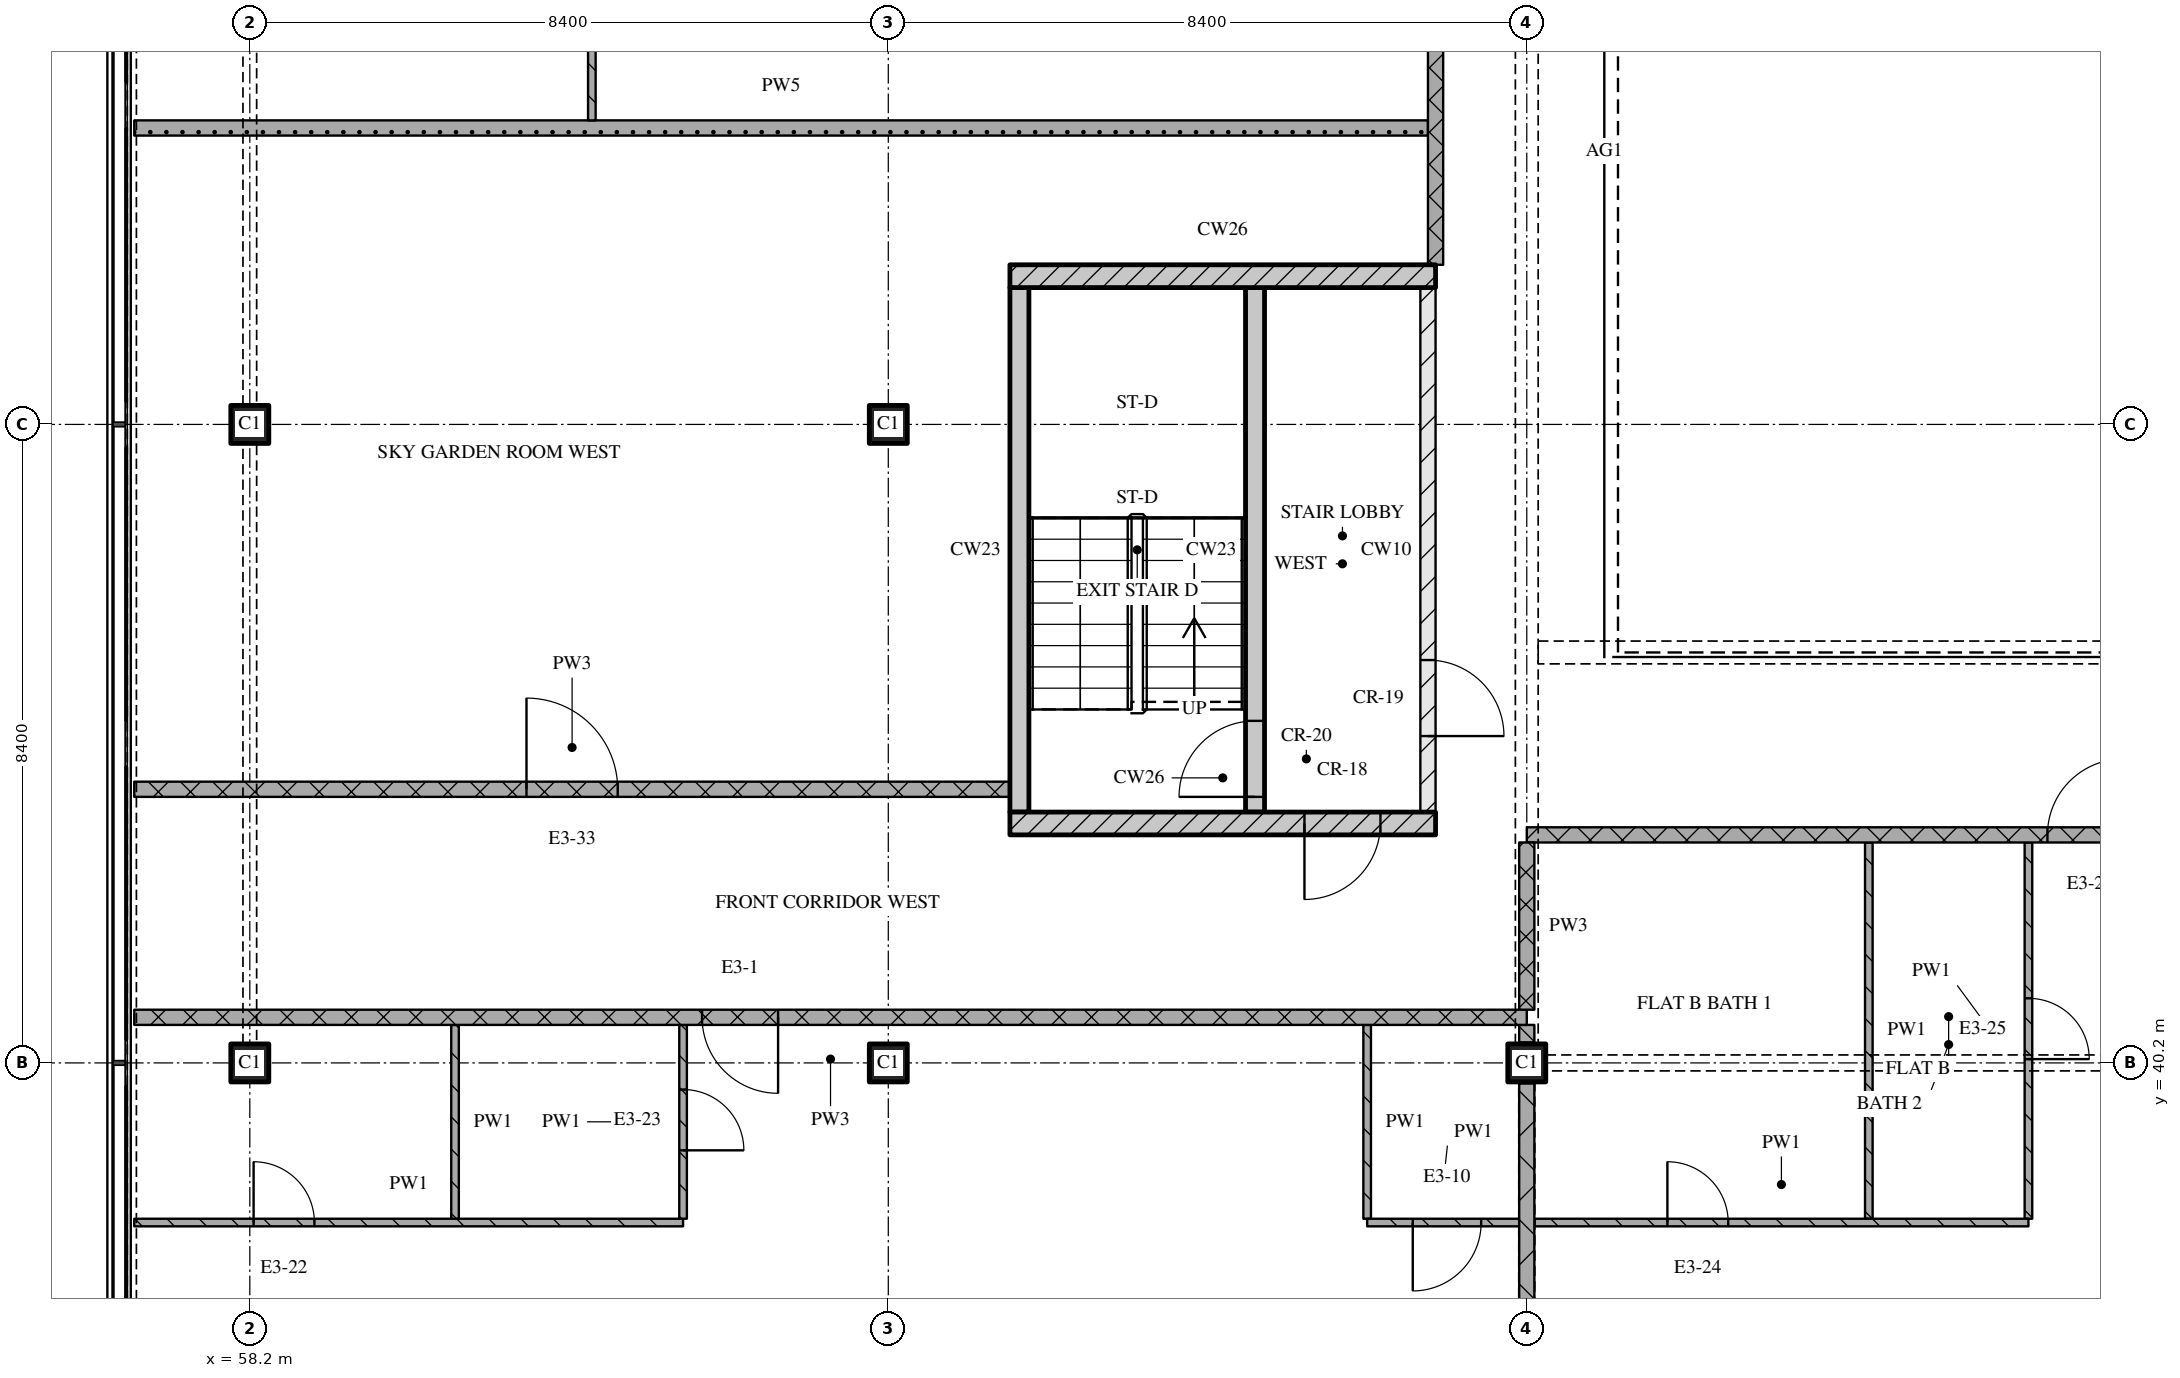
"""IFC4 building model, lengths in metres.
Left out: names, types, materials, properties, quantities, classifications, styles, units other than length and angle.
Written with IfcOpenShell. Run it as: python <this file> out.ifc"""

import sys

from ifc_helpers import new_model, si_unit, direction, frame, frame_2d, origin, origin_2d, place, context, subcontext, project, spatial, rectangle, extrude, element, fill, save


model = new_model("IFC4")
c1 = context("Model", 3, precision=1e-05, world=origin(), true_north=direction((0.0, 1.0)))
c2 = subcontext(c1, "Body", "Model", "MODEL_VIEW")
j1 = project(units=[si_unit("LENGTHUNIT", "METRE"), si_unit("PLANEANGLEUNIT", "RADIAN")], contexts=[c1])
p1 = place(None, origin())
s1 = spatial("IfcSite", under=j1, at=p1, CompositionType="ELEMENT")
p2 = place(p1, origin())
s2 = spatial("IfcBuilding", under=s1, at=p2, CompositionType="ELEMENT")
p3 = place(p2, frame((0.0, 0.0, 274.35)))
s3 = spatial("IfcBuildingStorey", under=s2, at=p3, CompositionType="ELEMENT", Elevation=274.35)
for number, where, z_axis, x_axis in (
    (1, (58.2, 40.2, 0.0), (0.0, 0.0, 1.0), (1.0, 0.0, 0.0)),
    (2, (58.2, 48.6, 0.0), (0.0, 0.0, 1.0), (1.0, 0.0, 0.0)),
    (3, (66.6, 40.2, 0.0), (0.0, 0.0, 1.0), (1.0, 0.0, 0.0)),
    (4, (66.6, 48.6, 0.0), (0.0, 0.0, 1.0), (1.0, 0.0, 0.0)),
    (5, (75.0, 40.2, 0.0), (0.0, 0.0, 1.0), (1.0, 0.0, 0.0)),
):
    element("IfcColumn", number, at=place(p3, frame(where, z_axis=z_axis, x_axis=x_axis)), inside=s3, PredefinedType="COLUMN", context=c2, shape_type="SweptSolid", body=[
        extrude(rectangle(XDim=0.5, YDim=0.5, at=origin_2d()), origin(), (0.0, 0.0, 1.0), 3.6),
    ])
p4 = place(p3, frame((68.2, 43.35, 0.0), z_axis=(0.0, 0.0, 1.0), x_axis=(1.0, 0.0, 0.0)))
e6 = element("IfcWall", 6, at=p4, inside=s3, PredefinedType="SOLIDWALL", context=c2, shape_type="SweptSolid", body=[
    extrude(rectangle(XDim=5.6, YDim=0.3, at=frame_2d((2.8, 0.0))), origin(), (0.0, 0.0, 1.0), 3.32),
])
p5 = place(p4, frame((3.875, 0.0, 0.0)))
e7 = element("IfcOpeningElement", 7, at=p5, cuts=e6, PredefinedType="OPENING", context=c2, shape_type="SweptSolid", body=[
    extrude(rectangle(XDim=1.0, YDim=2.1, at=frame_2d((0.5, 1.05))), frame((0.0, 0.16, 0.0), z_axis=(0.0, -1.0, 0.0), x_axis=(1.0, 0.0, 0.0)), (0.0, 0.0, 1.0), 0.32),
])
p6 = place(p3, frame((68.325, 43.5, 0.0), z_axis=(0.0, 0.0, 1.0), x_axis=(0.0, 1.0, 0.0)))
e8 = element("IfcWall", 8, at=p6, inside=s3, PredefinedType="SOLIDWALL", context=c2, shape_type="SweptSolid", body=[
    extrude(rectangle(XDim=6.9, YDim=0.25, at=frame_2d((3.45, 0.0))), origin(), (0.0, 0.0, 1.0), 3.32),
])
p7 = place(p3, frame((71.425, 43.5, 0.0), z_axis=(0.0, 0.0, 1.0), x_axis=(0.0, 1.0, 0.0)))
e9 = element("IfcWall", 9, at=p7, inside=s3, PredefinedType="SOLIDWALL", context=c2, shape_type="SweptSolid", body=[
    extrude(rectangle(XDim=6.9, YDim=0.25, at=frame_2d((3.45, 0.0))), origin(), (0.0, 0.0, 1.0), 3.32),
])
p8 = place(p7, frame((0.2, 0.0, 0.0)))
e10 = element("IfcOpeningElement", 10, at=p8, cuts=e9, PredefinedType="OPENING", context=c2, shape_type="SweptSolid", body=[
    extrude(rectangle(XDim=1.0, YDim=2.1, at=frame_2d((0.5, 1.05))), frame((0.0, 0.135, 0.0), z_axis=(0.0, -1.0, 0.0), x_axis=(1.0, 0.0, 0.0)), (0.0, 0.0, 1.0), 0.27),
])
p9 = place(p3, frame((73.7, 43.5, 0.0), z_axis=(0.0, 0.0, 1.0), x_axis=(0.0, 1.0, 0.0)))
e11 = element("IfcWall", 11, at=p9, inside=s3, PredefinedType="PARTITIONING", context=c2, shape_type="SweptSolid", body=[
    extrude(rectangle(XDim=6.9, YDim=0.2, at=frame_2d((3.45, 0.0))), origin(), (0.0, 0.0, 1.0), 3.32),
])
p10 = place(p9, frame((1.0, 0.0, 0.0)))
e12 = element("IfcOpeningElement", 12, at=p10, cuts=e11, PredefinedType="OPENING", context=c2, shape_type="SweptSolid", body=[
    extrude(rectangle(XDim=1.0, YDim=2.1, at=frame_2d((0.5, 1.05))), frame((0.0, 0.11, 0.0), z_axis=(0.0, -1.0, 0.0), x_axis=(1.0, 0.0, 0.0)), (0.0, 0.0, 1.0), 0.22),
])
p11 = place(p3, frame((68.2, 50.55, 0.0), z_axis=(0.0, 0.0, 1.0), x_axis=(1.0, 0.0, 0.0)))
e13 = element("IfcWall", 13, at=p11, inside=s3, PredefinedType="SOLIDWALL", context=c2, shape_type="SweptSolid", body=[
    extrude(rectangle(XDim=5.6, YDim=0.3, at=frame_2d((2.8, 0.0))), origin(), (0.0, 0.0, 1.0), 3.32),
])
p12 = place(p3, frame((56.68, 38.1, 0.0), z_axis=(0.0, 0.0, 1.0), x_axis=(1.0, 0.0, 0.0)))
e14 = element("IfcWall", 14, at=p12, inside=s3, PredefinedType="PARTITIONING", context=c2, shape_type="SweptSolid", body=[
    extrude(rectangle(XDim=7.22, YDim=0.1, at=frame_2d((3.61, 0.0))), origin(), (0.0, 0.0, 1.0), 3.32),
])
p13 = place(p12, frame((1.57, 0.0, 0.0)))
e15 = element("IfcOpeningElement", 15, at=p13, cuts=e14, PredefinedType="OPENING", context=c2, shape_type="SweptSolid", body=[
    extrude(rectangle(XDim=0.8, YDim=2.1, at=frame_2d((0.4, 1.05))), frame((0.0, 0.06, 0.0), z_axis=(0.0, -1.0, 0.0), x_axis=(1.0, 0.0, 0.0)), (0.0, 0.0, 1.0), 0.12),
])
p14 = place(p3, frame((75.0, 40.8, 0.0), z_axis=(0.0, 0.0, 1.0), x_axis=(-1.0, 0.0, 0.0)))
e16 = element("IfcWall", 16, at=p14, inside=s3, PredefinedType="PARTITIONING", context=c2, shape_type="SweptSolid", body=[
    extrude(rectangle(XDim=18.32, YDim=0.2, at=frame_2d((9.16, 0.0))), origin(), (0.0, 0.0, 1.0), 3.32),
])
p15 = place(p14, frame((9.85, 0.0, 0.0)))
e17 = element("IfcOpeningElement", 17, at=p15, cuts=e16, PredefinedType="OPENING", context=c2, shape_type="SweptSolid", body=[
    extrude(rectangle(XDim=1.0, YDim=2.1, at=frame_2d((0.5, 1.05))), frame((0.0, 0.11, 0.0), z_axis=(0.0, -1.0, 0.0), x_axis=(1.0, 0.0, 0.0)), (0.0, 0.0, 1.0), 0.22),
])
p16 = place(p3, frame((100.2, 43.2, 0.0), z_axis=(0.0, 0.0, 1.0), x_axis=(-1.0, 0.0, 0.0)))
e18 = element("IfcWall", 18, at=p16, inside=s3, PredefinedType="PARTITIONING", context=c2, shape_type="SweptSolid", body=[
    extrude(rectangle(XDim=25.2, YDim=0.2, at=frame_2d((12.6, 0.0))), origin(), (0.0, 0.0, 1.0), 3.32),
])
p17 = place(p16, frame((17.35, 0.0, 0.0)))
e19 = element("IfcOpeningElement", 19, at=p17, cuts=e18, PredefinedType="OPENING", context=c2, shape_type="SweptSolid", body=[
    extrude(rectangle(XDim=1.0, YDim=2.1, at=frame_2d((0.5, 1.05))), frame((0.0, 0.11, 0.0), z_axis=(0.0, -1.0, 0.0), x_axis=(1.0, 0.0, 0.0)), (0.0, 0.0, 1.0), 0.22),
])
p18 = place(p3, frame((56.68, 43.8, 0.0), z_axis=(0.0, 0.0, 1.0), x_axis=(1.0, 0.0, 0.0)))
e20 = element("IfcWall", 20, at=p18, inside=s3, PredefinedType="PARTITIONING", context=c2, shape_type="SweptSolid", body=[
    extrude(rectangle(XDim=11.52, YDim=0.2, at=frame_2d((5.76, 0.0))), origin(), (0.0, 0.0, 1.0), 3.32),
])
p19 = place(p18, frame((5.16, 0.0, 0.0)))
e21 = element("IfcOpeningElement", 21, at=p19, cuts=e20, PredefinedType="OPENING", context=c2, shape_type="SweptSolid", body=[
    extrude(rectangle(XDim=1.2, YDim=2.1, at=frame_2d((0.6, 1.05))), frame((0.0, 0.11, 0.0), z_axis=(0.0, -1.0, 0.0), x_axis=(1.0, 0.0, 0.0)), (0.0, 0.0, 1.0), 0.22),
])
p20 = place(p3, frame((56.68, 52.5, 0.0), z_axis=(0.0, 0.0, 1.0), x_axis=(1.0, 0.0, 0.0)))
e22 = element("IfcWall", 22, at=p20, inside=s3, PredefinedType="PARTITIONING", context=c2, shape_type="SweptSolid", body=[
    extrude(rectangle(XDim=17.02, YDim=0.2, at=frame_2d((8.51, 0.0))), origin(), (0.0, 0.0, 1.0), 3.32),
])
p21 = place(p3, frame((60.9, 40.7, 0.0), z_axis=(0.0, 0.0, 1.0), x_axis=(0.0, -1.0, 0.0)))
e23 = element("IfcWall", 23, at=p21, inside=s3, PredefinedType="PARTITIONING", context=c2, shape_type="SweptSolid", body=[
    extrude(rectangle(XDim=2.55, YDim=0.1, at=frame_2d((1.275, 0.0))), origin(), (0.0, 0.0, 1.0), 3.32),
])
p22 = place(p3, frame((62.7, 52.6, 0.0), z_axis=(0.0, 0.0, 1.0), x_axis=(0.0, 1.0, 0.0)))
e24 = element("IfcWall", 24, at=p22, inside=s3, PredefinedType="PARTITIONING", context=c2, shape_type="SweptSolid", body=[
    extrude(rectangle(XDim=3.0, YDim=0.1, at=frame_2d((1.5, 0.0))), origin(), (0.0, 0.0, 1.0), 3.32),
])
p23 = place(p22, frame((1.025, 0.0, 0.0)))
e25 = element("IfcOpeningElement", 25, at=p23, cuts=e24, PredefinedType="OPENING", context=c2, shape_type="SweptSolid", body=[
    extrude(rectangle(XDim=0.9, YDim=2.1, at=frame_2d((0.45, 1.05))), frame((0.0, 0.06, 0.0), z_axis=(0.0, -1.0, 0.0), x_axis=(1.0, 0.0, 0.0)), (0.0, 0.0, 1.0), 0.12),
])
p24 = place(p3, frame((63.9, 38.15, 0.0), z_axis=(0.0, 0.0, 1.0), x_axis=(0.0, 1.0, 0.0)))
e26 = element("IfcWall", 26, at=p24, inside=s3, PredefinedType="PARTITIONING", context=c2, shape_type="SweptSolid", body=[
    extrude(rectangle(XDim=2.55, YDim=0.1, at=frame_2d((1.275, 0.0))), origin(), (0.0, 0.0, 1.0), 3.32),
])
p25 = place(p24, frame((0.9, 0.0, 0.0)))
e27 = element("IfcOpeningElement", 27, at=p25, cuts=e26, PredefinedType="OPENING", context=c2, shape_type="SweptSolid", body=[
    extrude(rectangle(XDim=0.8, YDim=2.1, at=frame_2d((0.4, 1.05))), frame((0.0, 0.06, 0.0), z_axis=(0.0, -1.0, 0.0), x_axis=(1.0, 0.0, 0.0)), (0.0, 0.0, 1.0), 0.12),
])
p26 = place(p3, frame((72.9, 40.7, 0.0), z_axis=(0.0, 0.0, 1.0), x_axis=(0.0, -1.0, 0.0)))
e28 = element("IfcWall", 28, at=p26, inside=s3, PredefinedType="PARTITIONING", context=c2, shape_type="SweptSolid", body=[
    extrude(rectangle(XDim=2.55, YDim=0.1, at=frame_2d((1.275, 0.0))), origin(), (0.0, 0.0, 1.0), 3.32),
])
p27 = place(p3, frame((73.8, 50.7, 0.0), z_axis=(0.0, 0.0, 1.0), x_axis=(0.0, 1.0, 0.0)))
e29 = element("IfcWall", 29, at=p27, inside=s3, PredefinedType="PARTITIONING", context=c2, shape_type="SweptSolid", body=[
    extrude(rectangle(XDim=8.0, YDim=0.2, at=frame_2d((4.0, 0.0))), origin(), (0.0, 0.0, 1.0), 3.32),
])
p28 = place(p27, frame((4.45, 0.0, 0.0)))
e30 = element("IfcOpeningElement", 30, at=p28, cuts=e29, PredefinedType="OPENING", context=c2, shape_type="SweptSolid", body=[
    extrude(rectangle(XDim=1.0, YDim=2.1, at=frame_2d((0.5, 1.05))), frame((0.0, 0.11, 0.0), z_axis=(0.0, -1.0, 0.0), x_axis=(1.0, 0.0, 0.0)), (0.0, 0.0, 1.0), 0.22),
])
p29 = place(p3, frame((75.0, 43.1, 0.0), z_axis=(0.0, 0.0, 1.0), x_axis=(0.0, -1.0, 0.0)))
e31 = element("IfcWall", 31, at=p29, inside=s3, PredefinedType="PARTITIONING", context=c2, shape_type="SweptSolid", body=[
    extrude(rectangle(XDim=2.2, YDim=0.2, at=frame_2d((1.1, 0.0))), origin(), (0.0, 0.0, 1.0), 2.53),
])
p30 = place(p3, frame((75.0, 39.93, 0.0), z_axis=(0.0, 0.0, 1.0), x_axis=(0.0, -1.0, 0.0)))
e32 = element("IfcWall", 32, at=p30, inside=s3, PredefinedType="PARTITIONING", context=c2, shape_type="SweptSolid", body=[
    extrude(rectangle(XDim=7.86, YDim=0.2, at=frame_2d((3.93, 0.0))), origin(), (0.0, 0.0, 1.0), 2.77),
])
p31 = place(p3, frame((75.0, 40.7, 0.0), z_axis=(0.0, 0.0, 1.0), x_axis=(0.0, -1.0, 0.0)))
e33 = element("IfcWall", 33, at=p31, inside=s3, PredefinedType="PARTITIONING", context=c2, shape_type="SweptSolid", body=[
    extrude(rectangle(XDim=0.23, YDim=0.2, at=frame_2d((0.115, 0.0))), origin(), (0.0, 0.0, 1.0), 3.32),
])
p32 = place(p3, frame((79.5, 43.1, 0.0), z_axis=(0.0, 0.0, 1.0), x_axis=(0.0, -1.0, 0.0)))
e34 = element("IfcWall", 34, at=p32, inside=s3, PredefinedType="PARTITIONING", context=c2, shape_type="SweptSolid", body=[
    extrude(rectangle(XDim=4.95, YDim=0.1, at=frame_2d((2.475, 0.0))), origin(), (0.0, 0.0, 1.0), 3.32),
])
p33 = place(p3, frame((81.6, 38.15, 0.0), z_axis=(0.0, 0.0, 1.0), x_axis=(0.0, 1.0, 0.0)))
e35 = element("IfcWall", 35, at=p33, inside=s3, PredefinedType="PARTITIONING", context=c2, shape_type="SweptSolid", body=[
    extrude(rectangle(XDim=4.95, YDim=0.1, at=frame_2d((2.475, 0.0))), origin(), (0.0, 0.0, 1.0), 3.32),
])
p34 = place(p33, frame((2.1, 0.0, 0.0)))
e36 = element("IfcOpeningElement", 36, at=p34, cuts=e35, PredefinedType="OPENING", context=c2, shape_type="SweptSolid", body=[
    extrude(rectangle(XDim=0.8, YDim=2.1, at=frame_2d((0.4, 1.05))), frame((0.0, 0.06, 0.0), z_axis=(0.0, -1.0, 0.0), x_axis=(1.0, 0.0, 0.0)), (0.0, 0.0, 1.0), 0.12),
])
p35 = place(p3, frame((72.9, 38.1, 0.0), z_axis=(0.0, 0.0, 1.0), x_axis=(1.0, 0.0, 0.0)))
e37 = element("IfcWall", 37, at=p35, inside=s3, PredefinedType="PARTITIONING", context=c2, shape_type="SweptSolid", body=[
    extrude(rectangle(XDim=2.0, YDim=0.1, at=frame_2d((1.0, 0.0))), origin(), (0.0, 0.0, 1.0), 3.32),
])
p36 = place(p35, frame((0.6, 0.0, 0.0)))
e38 = element("IfcOpeningElement", 38, at=p36, cuts=e37, PredefinedType="OPENING", context=c2, shape_type="SweptSolid", body=[
    extrude(rectangle(XDim=0.9, YDim=2.1, at=frame_2d((0.45, 1.05))), frame((0.0, 0.06, 0.0), z_axis=(0.0, -1.0, 0.0), x_axis=(1.0, 0.0, 0.0)), (0.0, 0.0, 1.0), 0.12),
])
p37 = place(p3, frame((75.1, 38.1, 0.0), z_axis=(0.0, 0.0, 1.0), x_axis=(1.0, 0.0, 0.0)))
e39 = element("IfcWall", 39, at=p37, inside=s3, PredefinedType="PARTITIONING", context=c2, shape_type="SweptSolid", body=[
    extrude(rectangle(XDim=6.5, YDim=0.1, at=frame_2d((3.25, 0.0))), origin(), (0.0, 0.0, 1.0), 3.32),
])
p38 = place(p37, frame((1.75, 0.0, 0.0)))
e40 = element("IfcOpeningElement", 40, at=p38, cuts=e39, PredefinedType="OPENING", context=c2, shape_type="SweptSolid", body=[
    extrude(rectangle(XDim=0.8, YDim=2.1, at=frame_2d((0.4, 1.05))), frame((0.0, 0.06, 0.0), z_axis=(0.0, -1.0, 0.0), x_axis=(1.0, 0.0, 0.0)), (0.0, 0.0, 1.0), 0.12),
])
p39 = place(p5, origin())
e41 = element("IfcDoor", 41, at=p39, inside=s3, OperationType="SINGLE_SWING_RIGHT", PredefinedType="DOOR", context=c2, shape_type="SweptSolid", body=[
    extrude(rectangle(XDim=1.0, YDim=2.1, at=frame_2d((0.5, 1.05))), frame((0.0, 0.025, 0.0), z_axis=(0.0, -1.0, 0.0), x_axis=(1.0, 0.0, 0.0)), (0.0, 0.0, 1.0), 0.05),
])
fill(e7, e41)
p40 = place(p8, origin())
e42 = element("IfcDoor", 42, at=p40, inside=s3, OperationType="SINGLE_SWING_LEFT", PredefinedType="DOOR", context=c2, shape_type="SweptSolid", body=[
    extrude(rectangle(XDim=1.0, YDim=2.1, at=frame_2d((0.5, 1.05))), frame((0.0, 0.025, 0.0), z_axis=(0.0, -1.0, 0.0), x_axis=(1.0, 0.0, 0.0)), (0.0, 0.0, 1.0), 0.05),
])
fill(e10, e42)
p41 = place(p10, origin())
e43 = element("IfcDoor", 43, at=p41, inside=s3, OperationType="SINGLE_SWING_RIGHT", PredefinedType="DOOR", context=c2, shape_type="SweptSolid", body=[
    extrude(rectangle(XDim=1.0, YDim=2.1, at=frame_2d((0.5, 1.05))), frame((0.0, 0.025, 0.0), z_axis=(0.0, -1.0, 0.0), x_axis=(1.0, 0.0, 0.0)), (0.0, 0.0, 1.0), 0.05),
])
fill(e12, e43)
p42 = place(p13, origin())
e44 = element("IfcDoor", 44, at=p42, inside=s3, OperationType="SINGLE_SWING_LEFT", PredefinedType="DOOR", context=c2, shape_type="SweptSolid", body=[
    extrude(rectangle(XDim=0.8, YDim=2.1, at=frame_2d((0.4, 1.05))), frame((0.0, 0.025, 0.0), z_axis=(0.0, -1.0, 0.0), x_axis=(1.0, 0.0, 0.0)), (0.0, 0.0, 1.0), 0.05),
])
fill(e15, e44)
p43 = place(p15, origin())
e45 = element("IfcDoor", 45, at=p43, inside=s3, OperationType="SINGLE_SWING_LEFT", PredefinedType="DOOR", context=c2, shape_type="SweptSolid", body=[
    extrude(rectangle(XDim=1.0, YDim=2.1, at=frame_2d((0.5, 1.05))), frame((0.0, 0.025, 0.0), z_axis=(0.0, -1.0, 0.0), x_axis=(1.0, 0.0, 0.0)), (0.0, 0.0, 1.0), 0.05),
])
fill(e17, e45)
p44 = place(p17, origin())
e46 = element("IfcDoor", 46, at=p44, inside=s3, OperationType="SINGLE_SWING_RIGHT", PredefinedType="DOOR", context=c2, shape_type="SweptSolid", body=[
    extrude(rectangle(XDim=1.0, YDim=2.1, at=frame_2d((0.5, 1.05))), frame((0.0, 0.025, 0.0), z_axis=(0.0, -1.0, 0.0), x_axis=(1.0, 0.0, 0.0)), (0.0, 0.0, 1.0), 0.05),
])
fill(e19, e46)
p45 = place(p19, origin())
e47 = element("IfcDoor", 47, at=p45, inside=s3, OperationType="SINGLE_SWING_LEFT", PredefinedType="DOOR", context=c2, shape_type="SweptSolid", body=[
    extrude(rectangle(XDim=1.2, YDim=2.1, at=frame_2d((0.6, 1.05))), frame((0.0, 0.025, 0.0), z_axis=(0.0, -1.0, 0.0), x_axis=(1.0, 0.0, 0.0)), (0.0, 0.0, 1.0), 0.05),
])
fill(e21, e47)
p46 = place(p25, origin())
e48 = element("IfcDoor", 48, at=p46, inside=s3, OperationType="SINGLE_SWING_RIGHT", PredefinedType="DOOR", context=c2, shape_type="SweptSolid", body=[
    extrude(rectangle(XDim=0.8, YDim=2.1, at=frame_2d((0.4, 1.05))), frame((0.0, 0.025, 0.0), z_axis=(0.0, -1.0, 0.0), x_axis=(1.0, 0.0, 0.0)), (0.0, 0.0, 1.0), 0.05),
])
fill(e27, e48)
p47 = place(p34, origin())
e49 = element("IfcDoor", 49, at=p47, inside=s3, OperationType="SINGLE_SWING_RIGHT", PredefinedType="DOOR", context=c2, shape_type="SweptSolid", body=[
    extrude(rectangle(XDim=0.8, YDim=2.1, at=frame_2d((0.4, 1.05))), frame((0.0, 0.025, 0.0), z_axis=(0.0, -1.0, 0.0), x_axis=(1.0, 0.0, 0.0)), (0.0, 0.0, 1.0), 0.05),
])
fill(e36, e49)
p48 = place(p36, origin())
e50 = element("IfcDoor", 50, at=p48, inside=s3, OperationType="SINGLE_SWING_RIGHT", PredefinedType="DOOR", context=c2, shape_type="SweptSolid", body=[
    extrude(rectangle(XDim=0.9, YDim=2.1, at=frame_2d((0.45, 1.05))), frame((0.0, 0.025, 0.0), z_axis=(0.0, -1.0, 0.0), x_axis=(1.0, 0.0, 0.0)), (0.0, 0.0, 1.0), 0.05),
])
fill(e38, e50)
p49 = place(p38, origin())
e51 = element("IfcDoor", 51, at=p49, inside=s3, OperationType="SINGLE_SWING_LEFT", PredefinedType="DOOR", context=c2, shape_type="SweptSolid", body=[
    extrude(rectangle(XDim=0.8, YDim=2.1, at=frame_2d((0.4, 1.05))), frame((0.0, 0.025, 0.0), z_axis=(0.0, -1.0, 0.0), x_axis=(1.0, 0.0, 0.0)), (0.0, 0.0, 1.0), 0.05),
])
fill(e40, e51)
save(model, sys.argv[1])
